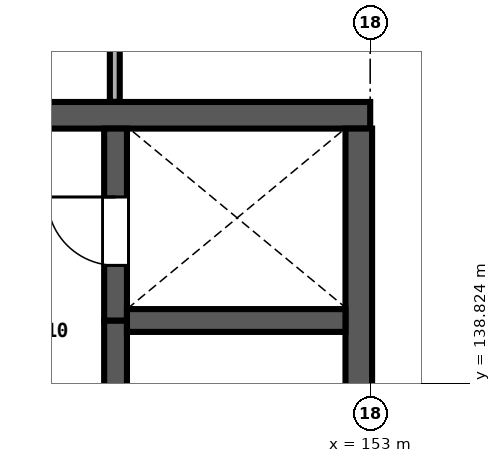
"""IFC4 building model, lengths in metres.
Left out: names, types, materials, properties, quantities, classifications, styles, units other than length and angle.
Written with IfcOpenShell. Run it as: python <this file> out.ifc"""

import sys

from ifc_helpers import new_model, si_unit, direction, frame, frame_2d, origin, place, context, subcontext, project, spatial, rectangle, extrude, element, fill, save


model = new_model("IFC4")
c1 = context("Model", 3, precision=1e-05, world=origin(), true_north=direction((0.0, 1.0)))
c2 = subcontext(c1, "Body", "Model", "MODEL_VIEW")
j1 = project(units=[si_unit("LENGTHUNIT", "METRE"), si_unit("PLANEANGLEUNIT", "RADIAN")], contexts=[c1])
p1 = place(None, origin())
s1 = spatial("IfcSite", under=j1, at=p1, CompositionType="ELEMENT")
p2 = place(p1, origin())
s2 = spatial("IfcBuilding", under=s1, at=p2, CompositionType="ELEMENT")
p3 = place(p2, frame((0.0, 0.0, 4.8)))
s3 = spatial("IfcBuildingStorey", under=s2, at=p3, CompositionType="ELEMENT", Elevation=4.8)
p4 = place(p3, frame((153.0, 142.35, 0.0), z_axis=(0.0, 0.0, 1.0), x_axis=(-1.0, 0.0, 0.0)))
e1 = element("IfcWall", 1, at=p4, inside=s3, PredefinedType="SHEAR", context=c2, shape_type="SweptSolid", body=[
    extrude(rectangle(XDim=18.0, YDim=0.35, at=frame_2d((9.0, 0.0))), origin(), (0.0, 0.0, 1.0), 4.52),
])
p5 = place(p4, frame((4.7, 0.0, 0.0)))
e2 = element("IfcOpeningElement", 2, at=p5, cuts=e1, PredefinedType="OPENING", context=c2, shape_type="SweptSolid", body=[
    extrude(rectangle(XDim=1.9, YDim=2.25, at=frame_2d((0.95, 1.125))), frame((0.0, 0.185, 0.0), z_axis=(0.0, -1.0, 0.0), x_axis=(1.0, 0.0, 0.0)), (0.0, 0.0, 1.0), 0.37),
])
p6 = place(p3, frame((152.85, 136.825, 0.0), z_axis=(0.0, 0.0, 1.0), x_axis=(0.0, 1.0, 0.0)))
e3 = element("IfcWall", 3, at=p6, inside=s3, PredefinedType="SHEAR", context=c2, shape_type="SweptSolid", body=[
    extrude(rectangle(XDim=5.35, YDim=0.35, at=frame_2d((2.675, 0.0))), origin(), (0.0, 0.0, 1.0), 4.52),
])
p7 = place(p3, frame((149.65, 136.825, 0.0), z_axis=(0.0, 0.0, 1.0), x_axis=(0.0, 1.0, 0.0)))
e4 = element("IfcWall", 4, at=p7, inside=s3, PredefinedType="SHEAR", context=c2, shape_type="SweptSolid", body=[
    extrude(rectangle(XDim=2.825, YDim=0.3, at=frame_2d((1.413, 0.0))), origin(), (0.0, 0.0, 1.0), 4.52),
])
p8 = place(p3, frame((149.65, 139.65, 0.0), z_axis=(0.0, 0.0, 1.0), x_axis=(0.0, 1.0, 0.0)))
e5 = element("IfcWall", 5, at=p8, inside=s3, PredefinedType="SHEAR", context=c2, shape_type="SweptSolid", body=[
    extrude(rectangle(XDim=2.525, YDim=0.3, at=frame_2d((1.263, 0.0))), origin(), (0.0, 0.0, 1.0), 4.52),
])
p9 = place(p8, frame((0.725, 0.0, 0.0)))
e6 = element("IfcOpeningElement", 6, at=p9, cuts=e5, PredefinedType="OPENING", context=c2, shape_type="SweptSolid", body=[
    extrude(rectangle(XDim=0.9, YDim=2.1, at=frame_2d((0.45, 1.05))), frame((0.0, 0.16, 0.0), z_axis=(0.0, -1.0, 0.0), x_axis=(1.0, 0.0, 0.0)), (0.0, 0.0, 1.0), 0.32),
])
p10 = place(p3, frame((149.8, 139.65, 0.0), z_axis=(0.0, 0.0, 1.0), x_axis=(1.0, 0.0, 0.0)))
e7 = element("IfcWall", 7, at=p10, inside=s3, PredefinedType="SHEAR", context=c2, shape_type="SweptSolid", body=[
    extrude(rectangle(XDim=2.875, YDim=0.3, at=frame_2d((1.438, 0.0))), origin(), (0.0, 0.0, 1.0), 4.52),
])
p11 = place(p3, frame((149.64, 146.98, 0.0), z_axis=(0.0, 0.0, 1.0), x_axis=(0.0, -1.0, 0.0)))
e8 = element("IfcWall", 8, at=p11, inside=s3, PredefinedType="PARTITIONING", context=c2, shape_type="SweptSolid", body=[
    extrude(rectangle(XDim=4.453, YDim=0.13, at=frame_2d((2.227, 0.0))), origin(), (0.0, 0.0, 1.0), 3.28),
])
p12 = place(p11, frame((1.425, 0.0, 0.0)))
e9 = element("IfcOpeningElement", 9, at=p12, cuts=e8, PredefinedType="OPENING", context=c2, shape_type="SweptSolid", body=[
    extrude(rectangle(XDim=1.55, YDim=2.2, at=frame_2d((0.775, 1.1))), frame((0.0, 0.075, 0.0), z_axis=(0.0, -1.0, 0.0), x_axis=(1.0, 0.0, 0.0)), (0.0, 0.0, 1.0), 0.15),
])
p13 = place(p9, origin())
e10 = element("IfcDoor", 10, at=p13, inside=s3, OperationType="SINGLE_SWING_RIGHT", PredefinedType="DOOR", context=c2, shape_type="SweptSolid", body=[
    extrude(rectangle(XDim=0.9, YDim=2.1, at=frame_2d((0.45, 1.05))), frame((0.0, 0.025, 0.0), z_axis=(0.0, -1.0, 0.0), x_axis=(1.0, 0.0, 0.0)), (0.0, 0.0, 1.0), 0.05),
])
fill(e6, e10)
save(model, sys.argv[1])
